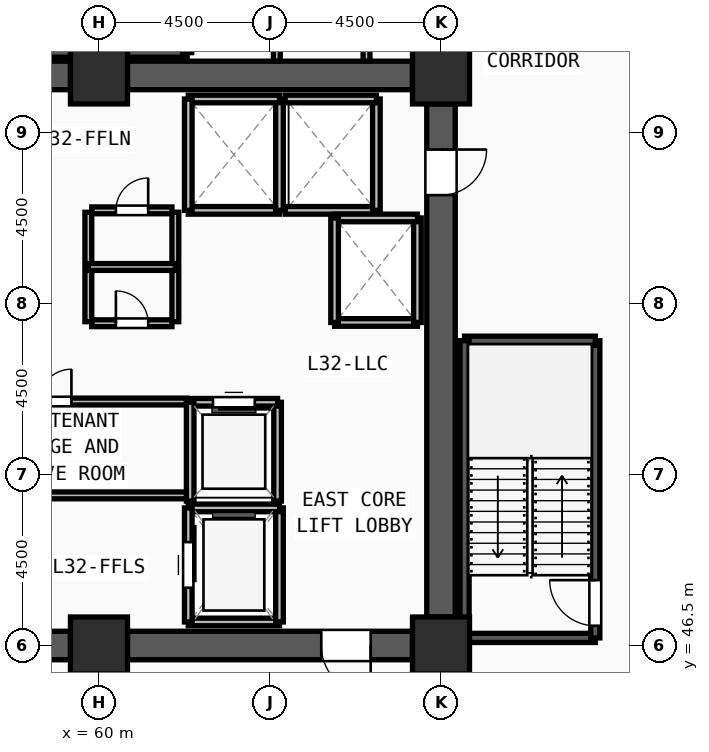
"""IFC4 building model, lengths in metres.
Left out: names, types, materials, properties, quantities, classifications, styles, units other than length and angle.
Written with IfcOpenShell. Run it as: python <this file> out.ifc"""

import sys

from ifc_helpers import new_model, si_unit, direction, frame, frame_2d, origin, origin_2d, place, context, subcontext, project, spatial, rectangle, extrude, source, transform, mapped, element, fill, save


model = new_model("IFC4")
c1 = context("Model", 3, precision=1e-05, world=origin(), true_north=direction((0.0, 1.0)))
c2 = subcontext(c1, "Body", "Model", "MODEL_VIEW")
j1 = project(units=[si_unit("LENGTHUNIT", "METRE"), si_unit("PLANEANGLEUNIT", "RADIAN")], contexts=[c1])
p1 = place(None, origin())
s1 = spatial("IfcSite", under=j1, at=p1, CompositionType="ELEMENT")
p2 = place(p1, origin())
s2 = spatial("IfcBuilding", under=s1, at=p2, CompositionType="ELEMENT")
p3 = place(p2, frame((0.0, 0.0, 124.5)))
s3 = spatial("IfcBuildingStorey", under=s2, at=p3, CompositionType="ELEMENT", Elevation=124.5)
m1 = source(origin(), c2, "Body", "SweptSolid", [
    extrude(rectangle(XDim=1.5, YDim=1.5, at=origin_2d()), origin(), (0.0, 0.0, 1.0), 3.75),
])
for number, where, z_axis, x_axis in (
    (1, (60.0, 46.5, 0.0), (0.0, 0.0, 1.0), (1.0, 0.0, 0.0)),
    (2, (69.0, 46.5, 0.0), (0.0, 0.0, 1.0), (1.0, 0.0, 0.0)),
    (3, (69.0, 61.5, 0.0), (0.0, 0.0, 1.0), (1.0, 0.0, 0.0)),
    (4, (60.0, 61.5, 0.0), (0.0, 0.0, 1.0), (1.0, 0.0, 0.0)),
):
    element("IfcColumn", number, at=place(p3, frame(where, z_axis=z_axis, x_axis=x_axis)), inside=s3, PredefinedType="COLUMN", context=c2, shape_type="MappedRepresentation", body=[
        mapped(m1, transform((0.0, 0.0, 0.0), x_axis=(1.0, 0.0, 0.0), y_axis=(0.0, 1.0, 0.0), z_axis=(0.0, 0.0, 1.0), scale=1.0)),
    ])
for number, where, z_axis, x_axis in (
    (5, (51.75, 61.5, 0.0), (0.0, 0.0, 1.0), (1.0, 0.0, 0.0)),
    (6, (60.75, 61.5, 0.0), (0.0, 0.0, 1.0), (1.0, 0.0, 0.0)),
):
    element("IfcWall", number, at=place(p3, frame(where, z_axis=z_axis, x_axis=x_axis)), inside=s3, PredefinedType="SHEAR", context=c2, shape_type="SweptSolid", body=[
        extrude(rectangle(XDim=7.5, YDim=0.75, at=frame_2d((3.75, 0.0))), origin(), (0.0, 0.0, 1.0), 3.57),
    ])
p4 = place(p3, frame((69.0, 60.75, 0.0), z_axis=(0.0, 0.0, 1.0), x_axis=(0.0, -1.0, 0.0)))
e7 = element("IfcWall", 7, at=p4, inside=s3, PredefinedType="SHEAR", context=c2, shape_type="SweptSolid", body=[
    extrude(rectangle(XDim=13.5, YDim=0.75, at=frame_2d((6.75, 0.0))), origin(), (0.0, 0.0, 1.0), 3.57),
])
m2 = source(origin(), c2, "Body", "SweptSolid", [
    extrude(rectangle(XDim=1.2, YDim=2.2, at=frame_2d((0.6, 1.1))), frame((0.0, 0.385, 0.0), z_axis=(0.0, -1.0, 0.0), x_axis=(1.0, 0.0, 0.0)), (0.0, 0.0, 1.0), 0.77),
])
p5 = place(p4, frame((1.2, 0.0, 0.0)))
e8 = element("IfcOpeningElement", 8, at=p5, cuts=e7, PredefinedType="OPENING", context=c2, shape_type="MappedRepresentation", body=[
    mapped(m2, transform((0.0, 0.0, 0.0), x_axis=(1.0, 0.0, 0.0), y_axis=(0.0, 1.0, 0.0), z_axis=(0.0, 0.0, 1.0), scale=1.0)),
])
p6 = place(p3, frame((68.25, 46.5, 0.0), z_axis=(0.0, 0.0, 1.0), x_axis=(-1.0, 0.0, 0.0)))
e9 = element("IfcWall", 9, at=p6, inside=s3, PredefinedType="SHEAR", context=c2, shape_type="SweptSolid", body=[
    extrude(rectangle(XDim=7.5, YDim=0.75, at=frame_2d((3.75, 0.0))), origin(), (0.0, 0.0, 1.0), 3.57),
])
m3 = source(origin(), c2, "Body", "SweptSolid", [
    extrude(rectangle(XDim=1.3, YDim=2.2, at=frame_2d((0.65, 1.1))), frame((0.0, 0.385, 0.0), z_axis=(0.0, -1.0, 0.0), x_axis=(1.0, 0.0, 0.0)), (0.0, 0.0, 1.0), 0.77),
])
p7 = place(p6, frame((1.1, 0.0, 0.0)))
e10 = element("IfcOpeningElement", 10, at=p7, cuts=e9, PredefinedType="OPENING", context=c2, shape_type="MappedRepresentation", body=[
    mapped(m3, transform((0.0, 0.0, 0.0), x_axis=(1.0, 0.0, 0.0), y_axis=(0.0, 1.0, 0.0), z_axis=(0.0, 0.0, 1.0), scale=1.0)),
])
p8 = place(p3, frame((59.25, 46.5, 0.0), z_axis=(0.0, 0.0, 1.0), x_axis=(-1.0, 0.0, 0.0)))
e11 = element("IfcWall", 11, at=p8, inside=s3, PredefinedType="SHEAR", context=c2, shape_type="SweptSolid", body=[
    extrude(rectangle(XDim=7.5, YDim=0.75, at=frame_2d((3.75, 0.0))), origin(), (0.0, 0.0, 1.0), 3.57),
])
p9 = place(p8, frame((5.1, 0.0, 0.0)))
e12 = element("IfcOpeningElement", 12, at=p9, cuts=e11, PredefinedType="OPENING", context=c2, shape_type="MappedRepresentation", body=[
    mapped(m3, transform((0.0, 0.0, 0.0), x_axis=(1.0, 0.0, 0.0), y_axis=(0.0, 1.0, 0.0), z_axis=(0.0, 0.0, 1.0), scale=1.0)),
])
m4 = source(origin(), c2, "Body", "SweptSolid", [
    extrude(rectangle(XDim=1.0, YDim=2.2, at=frame_2d((0.5, 1.1))), frame((0.0, 0.385, 0.0), z_axis=(0.0, -1.0, 0.0), x_axis=(1.0, 0.0, 0.0)), (0.0, 0.0, 1.0), 0.77),
])
p10 = place(p8, frame((0.6, 0.0, 0.0)))
e13 = element("IfcOpeningElement", 13, at=p10, cuts=e11, PredefinedType="OPENING", context=c2, shape_type="MappedRepresentation", body=[
    mapped(m4, transform((0.0, 0.0, 0.0), x_axis=(1.0, 0.0, 0.0), y_axis=(0.0, 1.0, 0.0), z_axis=(0.0, 0.0, 1.0), scale=1.0)),
])
p11 = place(p3, frame((69.62, 46.7, 0.0), z_axis=(0.0, 0.0, 1.0), x_axis=(1.0, 0.0, 0.0)))
e14 = element("IfcWall", 14, at=p11, inside=s3, PredefinedType="SOLIDWALL", context=c2, shape_type="SweptSolid", body=[
    extrude(rectangle(XDim=3.44, YDim=0.24, at=frame_2d((1.72, 0.0))), origin(), (0.0, 0.0, 1.0), 3.57),
])
p12 = place(p3, frame((73.06, 46.7, 0.0), z_axis=(0.0, 0.0, 1.0), x_axis=(0.0, 1.0, 0.0)))
e15 = element("IfcWall", 15, at=p12, inside=s3, PredefinedType="SOLIDWALL", context=c2, shape_type="SweptSolid", body=[
    extrude(rectangle(XDim=7.82, YDim=0.24, at=frame_2d((3.91, 0.0))), origin(), (0.0, 0.0, 1.0), 3.57),
])
m5 = source(origin(), c2, "Body", "SweptSolid", [
    extrude(rectangle(XDim=1.2, YDim=2.2, at=frame_2d((0.6, 1.1))), frame((0.0, 0.13, 0.0), z_axis=(0.0, -1.0, 0.0), x_axis=(1.0, 0.0, 0.0)), (0.0, 0.0, 1.0), 0.26),
])
p13 = place(p12, frame((0.32, 0.0, 0.0)))
e16 = element("IfcOpeningElement", 16, at=p13, cuts=e15, PredefinedType="OPENING", context=c2, shape_type="MappedRepresentation", body=[
    mapped(m5, transform((0.0, 0.0, 0.0), x_axis=(1.0, 0.0, 0.0), y_axis=(0.0, 1.0, 0.0), z_axis=(0.0, 0.0, 1.0), scale=1.0)),
])
p14 = place(p3, frame((73.06, 54.52, 0.0), z_axis=(0.0, 0.0, 1.0), x_axis=(-1.0, 0.0, 0.0)))
e17 = element("IfcWall", 17, at=p14, inside=s3, PredefinedType="SOLIDWALL", context=c2, shape_type="SweptSolid", body=[
    extrude(rectangle(XDim=3.44, YDim=0.24, at=frame_2d((1.72, 0.0))), origin(), (0.0, 0.0, 1.0), 3.57),
])
for number, where, z_axis, x_axis in (
    (18, (69.62, 54.52, 0.0), (0.0, 0.0, 1.0), (0.0, -1.0, 0.0)),
    (19, (54.5, 62.1, 0.0), (0.0, 0.0, 1.0), (1.0, 0.0, 0.0)),
):
    element("IfcWall", number, at=place(p3, frame(where, z_axis=z_axis, x_axis=x_axis)), inside=s3, PredefinedType="SOLIDWALL", context=c2, shape_type="SweptSolid", body=[
        extrude(rectangle(XDim=7.82, YDim=0.24, at=frame_2d((3.91, 0.0))), origin(), (0.0, 0.0, 1.0), 3.57),
    ])
p15 = place(p3, frame((62.32, 62.1, 0.0), z_axis=(0.0, 0.0, 1.0), x_axis=(0.0, 1.0, 0.0)))
e20 = element("IfcWall", 20, at=p15, inside=s3, PredefinedType="SOLIDWALL", context=c2, shape_type="SweptSolid", body=[
    extrude(rectangle(XDim=3.44, YDim=0.24, at=frame_2d((1.72, 0.0))), origin(), (0.0, 0.0, 1.0), 3.57),
])
p16 = place(p3, frame((62.35, 47.12, 0.0), z_axis=(0.0, 0.0, 1.0), x_axis=(1.0, 0.0, 0.0)))
e21 = element("IfcWall", 21, at=p16, inside=s3, PredefinedType="SOLIDWALL", context=c2, shape_type="SweptSolid", body=[
    extrude(rectangle(XDim=2.4, YDim=0.2, at=frame_2d((1.2, 0.0))), origin(), (0.0, 0.0, 1.0), 3.57),
])
p17 = place(p3, frame((64.75, 47.12, 0.0), z_axis=(0.0, 0.0, 1.0), x_axis=(0.0, 1.0, 0.0)))
e22 = element("IfcWall", 22, at=p17, inside=s3, PredefinedType="SOLIDWALL", context=c2, shape_type="SweptSolid", body=[
    extrude(rectangle(XDim=3.0, YDim=0.2, at=frame_2d((1.5, 0.0))), origin(), (0.0, 0.0, 1.0), 3.57),
])
p18 = place(p3, frame((64.75, 50.12, 0.0), z_axis=(0.0, 0.0, 1.0), x_axis=(-1.0, 0.0, 0.0)))
e23 = element("IfcWall", 23, at=p18, inside=s3, PredefinedType="SOLIDWALL", context=c2, shape_type="SweptSolid", body=[
    extrude(rectangle(XDim=2.4, YDim=0.2, at=frame_2d((1.2, 0.0))), origin(), (0.0, 0.0, 1.0), 3.57),
])
p19 = place(p3, frame((62.35, 50.12, 0.0), z_axis=(0.0, 0.0, 1.0), x_axis=(0.0, -1.0, 0.0)))
e24 = element("IfcWall", 24, at=p19, inside=s3, PredefinedType="SOLIDWALL", context=c2, shape_type="SweptSolid", body=[
    extrude(rectangle(XDim=3.0, YDim=0.2, at=frame_2d((1.5, 0.0))), origin(), (0.0, 0.0, 1.0), 3.57),
])
m6 = source(origin(), c2, "Body", "SweptSolid", [
    extrude(rectangle(XDim=1.2, YDim=2.3, at=frame_2d((0.6, 1.15))), frame((0.0, 0.11, 0.0), z_axis=(0.0, -1.0, 0.0), x_axis=(1.0, 0.0, 0.0)), (0.0, 0.0, 1.0), 0.22),
])
p20 = place(p19, frame((0.9, 0.0, 0.0)))
e25 = element("IfcOpeningElement", 25, at=p20, cuts=e24, PredefinedType="OPENING", context=c2, shape_type="MappedRepresentation", body=[
    mapped(m6, transform((0.0, 0.0, 0.0), x_axis=(1.0, 0.0, 0.0), y_axis=(0.0, 1.0, 0.0), z_axis=(0.0, 0.0, 1.0), scale=1.0)),
])
p21 = place(p3, frame((62.35, 57.95, 0.0), z_axis=(0.0, 0.0, 1.0), x_axis=(1.0, 0.0, 0.0)))
e26 = element("IfcWall", 26, at=p21, inside=s3, PredefinedType="SOLIDWALL", context=c2, shape_type="SweptSolid", body=[
    extrude(rectangle(XDim=2.4, YDim=0.2, at=frame_2d((1.2, 0.0))), origin(), (0.0, 0.0, 1.0), 3.57),
])
p22 = place(p3, frame((64.75, 57.95, 0.0), z_axis=(0.0, 0.0, 1.0), x_axis=(0.0, 1.0, 0.0)))
e27 = element("IfcWall", 27, at=p22, inside=s3, PredefinedType="SOLIDWALL", context=c2, shape_type="SweptSolid", body=[
    extrude(rectangle(XDim=2.93, YDim=0.2, at=frame_2d((1.465, 0.0))), origin(), (0.0, 0.0, 1.0), 3.57),
])
p23 = place(p3, frame((64.75, 60.88, 0.0), z_axis=(0.0, 0.0, 1.0), x_axis=(-1.0, 0.0, 0.0)))
e28 = element("IfcWall", 28, at=p23, inside=s3, PredefinedType="SOLIDWALL", context=c2, shape_type="SweptSolid", body=[
    extrude(rectangle(XDim=2.4, YDim=0.2, at=frame_2d((1.2, 0.0))), origin(), (0.0, 0.0, 1.0), 3.57),
])
p24 = place(p3, frame((62.35, 60.88, 0.0), z_axis=(0.0, 0.0, 1.0), x_axis=(0.0, -1.0, 0.0)))
e29 = element("IfcWall", 29, at=p24, inside=s3, PredefinedType="SOLIDWALL", context=c2, shape_type="SweptSolid", body=[
    extrude(rectangle(XDim=2.93, YDim=0.2, at=frame_2d((1.465, 0.0))), origin(), (0.0, 0.0, 1.0), 3.57),
])
p25 = place(p3, frame((64.9, 57.95, 0.0), z_axis=(0.0, 0.0, 1.0), x_axis=(1.0, 0.0, 0.0)))
e30 = element("IfcWall", 30, at=p25, inside=s3, PredefinedType="SOLIDWALL", context=c2, shape_type="SweptSolid", body=[
    extrude(rectangle(XDim=2.4, YDim=0.2, at=frame_2d((1.2, 0.0))), origin(), (0.0, 0.0, 1.0), 3.57),
])
p26 = place(p3, frame((67.3, 57.95, 0.0), z_axis=(0.0, 0.0, 1.0), x_axis=(0.0, 1.0, 0.0)))
e31 = element("IfcWall", 31, at=p26, inside=s3, PredefinedType="SOLIDWALL", context=c2, shape_type="SweptSolid", body=[
    extrude(rectangle(XDim=2.93, YDim=0.2, at=frame_2d((1.465, 0.0))), origin(), (0.0, 0.0, 1.0), 3.57),
])
p27 = place(p3, frame((67.3, 60.88, 0.0), z_axis=(0.0, 0.0, 1.0), x_axis=(-1.0, 0.0, 0.0)))
e32 = element("IfcWall", 32, at=p27, inside=s3, PredefinedType="SOLIDWALL", context=c2, shape_type="SweptSolid", body=[
    extrude(rectangle(XDim=2.4, YDim=0.2, at=frame_2d((1.2, 0.0))), origin(), (0.0, 0.0, 1.0), 3.57),
])
p28 = place(p3, frame((66.2, 55.0, 0.0), z_axis=(0.0, 0.0, 1.0), x_axis=(1.0, 0.0, 0.0)))
e33 = element("IfcWall", 33, at=p28, inside=s3, PredefinedType="SOLIDWALL", context=c2, shape_type="SweptSolid", body=[
    extrude(rectangle(XDim=2.18, YDim=0.2, at=frame_2d((1.09, 0.0))), origin(), (0.0, 0.0, 1.0), 3.57),
])
p29 = place(p3, frame((68.38, 55.0, 0.0), z_axis=(0.0, 0.0, 1.0), x_axis=(0.0, 1.0, 0.0)))
e34 = element("IfcWall", 34, at=p29, inside=s3, PredefinedType="SOLIDWALL", context=c2, shape_type="SweptSolid", body=[
    extrude(rectangle(XDim=2.75, YDim=0.2, at=frame_2d((1.375, 0.0))), origin(), (0.0, 0.0, 1.0), 3.57),
])
p30 = place(p3, frame((68.38, 57.75, 0.0), z_axis=(0.0, 0.0, 1.0), x_axis=(-1.0, 0.0, 0.0)))
e35 = element("IfcWall", 35, at=p30, inside=s3, PredefinedType="SOLIDWALL", context=c2, shape_type="SweptSolid", body=[
    extrude(rectangle(XDim=2.18, YDim=0.2, at=frame_2d((1.09, 0.0))), origin(), (0.0, 0.0, 1.0), 3.57),
])
p31 = place(p3, frame((66.2, 57.75, 0.0), z_axis=(0.0, 0.0, 1.0), x_axis=(0.0, -1.0, 0.0)))
e36 = element("IfcWall", 36, at=p31, inside=s3, PredefinedType="SOLIDWALL", context=c2, shape_type="SweptSolid", body=[
    extrude(rectangle(XDim=2.75, YDim=0.2, at=frame_2d((1.375, 0.0))), origin(), (0.0, 0.0, 1.0), 3.57),
])
p32 = place(p3, frame((64.7, 50.3, 0.0), z_axis=(0.0, 0.0, 1.0), x_axis=(0.0, 1.0, 0.0)))
e37 = element("IfcWall", 37, at=p32, inside=s3, PredefinedType="SOLIDWALL", context=c2, shape_type="SweptSolid", body=[
    extrude(rectangle(XDim=2.6, YDim=0.2, at=frame_2d((1.3, 0.0))), origin(), (0.0, 0.0, 1.0), 3.57),
])
p33 = place(p3, frame((64.7, 52.9, 0.0), z_axis=(0.0, 0.0, 1.0), x_axis=(-1.0, 0.0, 0.0)))
e38 = element("IfcWall", 38, at=p33, inside=s3, PredefinedType="SOLIDWALL", context=c2, shape_type="SweptSolid", body=[
    extrude(rectangle(XDim=2.3, YDim=0.2, at=frame_2d((1.15, 0.0))), origin(), (0.0, 0.0, 1.0), 3.57),
])
m7 = source(origin(), c2, "Body", "SweptSolid", [
    extrude(rectangle(XDim=1.1, YDim=2.2, at=frame_2d((0.55, 1.1))), frame((0.0, 0.11, 0.0), z_axis=(0.0, -1.0, 0.0), x_axis=(1.0, 0.0, 0.0)), (0.0, 0.0, 1.0), 0.22),
])
p34 = place(p33, frame((0.6, 0.0, 0.0)))
e39 = element("IfcOpeningElement", 39, at=p34, cuts=e38, PredefinedType="OPENING", context=c2, shape_type="MappedRepresentation", body=[
    mapped(m7, transform((0.0, 0.0, 0.0), x_axis=(1.0, 0.0, 0.0), y_axis=(0.0, 1.0, 0.0), z_axis=(0.0, 0.0, 1.0), scale=1.0)),
])
p35 = place(p3, frame((62.4, 52.9, 0.0), z_axis=(0.0, 0.0, 1.0), x_axis=(0.0, -1.0, 0.0)))
e40 = element("IfcWall", 40, at=p35, inside=s3, PredefinedType="SOLIDWALL", context=c2, shape_type="SweptSolid", body=[
    extrude(rectangle(XDim=2.6, YDim=0.2, at=frame_2d((1.3, 0.0))), origin(), (0.0, 0.0, 1.0), 3.57),
])
p36 = place(p3, frame((55.37, 52.92, 0.0), z_axis=(0.0, 0.0, 1.0), x_axis=(1.0, 0.0, 0.0)))
e41 = element("IfcWall", 41, at=p36, inside=s3, PredefinedType="PARTITIONING", context=c2, shape_type="SweptSolid", body=[
    extrude(rectangle(XDim=6.93, YDim=0.18, at=frame_2d((3.465, 0.0))), origin(), (0.0, 0.0, 1.0), 3.57),
])
m8 = source(origin(), c2, "Body", "SweptSolid", [
    extrude(rectangle(XDim=0.85, YDim=2.1, at=frame_2d((0.425, 1.05))), frame((0.0, 0.1, 0.0), z_axis=(0.0, -1.0, 0.0), x_axis=(1.0, 0.0, 0.0)), (0.0, 0.0, 1.0), 0.2),
])
p37 = place(p36, frame((3.055, 0.0, 0.0)))
e42 = element("IfcOpeningElement", 42, at=p37, cuts=e41, PredefinedType="OPENING", context=c2, shape_type="MappedRepresentation", body=[
    mapped(m8, transform((0.0, 0.0, 0.0), x_axis=(1.0, 0.0, 0.0), y_axis=(0.0, 1.0, 0.0), z_axis=(0.0, 0.0, 1.0), scale=1.0)),
])
p38 = place(p3, frame((59.81, 54.98, 0.0), z_axis=(0.0, 0.0, 1.0), x_axis=(1.0, 0.0, 0.0)))
e43 = element("IfcWall", 43, at=p38, inside=s3, PredefinedType="PARTITIONING", context=c2, shape_type="SweptSolid", body=[
    extrude(rectangle(XDim=2.11, YDim=0.18, at=frame_2d((1.055, 0.0))), origin(), (0.0, 0.0, 1.0), 3.57),
])
p39 = place(p38, frame((0.635, 0.0, 0.0)))
e44 = element("IfcOpeningElement", 44, at=p39, cuts=e43, PredefinedType="OPENING", context=c2, shape_type="MappedRepresentation", body=[
    mapped(m8, transform((0.0, 0.0, 0.0), x_axis=(1.0, 0.0, 0.0), y_axis=(0.0, 1.0, 0.0), z_axis=(0.0, 0.0, 1.0), scale=1.0)),
])
p40 = place(p3, frame((59.81, 57.95, 0.0), z_axis=(0.0, 0.0, 1.0), x_axis=(1.0, 0.0, 0.0)))
e45 = element("IfcWall", 45, at=p40, inside=s3, PredefinedType="PARTITIONING", context=c2, shape_type="SweptSolid", body=[
    extrude(rectangle(XDim=2.11, YDim=0.18, at=frame_2d((1.055, 0.0))), origin(), (0.0, 0.0, 1.0), 3.57),
])
p41 = place(p40, frame((0.635, 0.0, 0.0)))
e46 = element("IfcOpeningElement", 46, at=p41, cuts=e45, PredefinedType="OPENING", context=c2, shape_type="MappedRepresentation", body=[
    mapped(m8, transform((0.0, 0.0, 0.0), x_axis=(1.0, 0.0, 0.0), y_axis=(0.0, 1.0, 0.0), z_axis=(0.0, 0.0, 1.0), scale=1.0)),
])
for number, where, z_axis, x_axis in (
    (47, (59.72, 55.02, 0.0), (0.0, 0.0, 1.0), (0.0, 1.0, 0.0)),
    (48, (62.01, 55.02, 0.0), (0.0, 0.0, 1.0), (0.0, 1.0, 0.0)),
):
    element("IfcWall", number, at=place(p3, frame(where, z_axis=z_axis, x_axis=x_axis)), inside=s3, PredefinedType="PARTITIONING", context=c2, shape_type="SweptSolid", body=[
        extrude(rectangle(XDim=2.88, YDim=0.18, at=frame_2d((1.44, 0.0))), origin(), (0.0, 0.0, 1.0), 3.57),
    ])
p42 = place(p3, frame((59.72, 56.46, 0.0), z_axis=(0.0, 0.0, 1.0), x_axis=(1.0, 0.0, 0.0)))
e49 = element("IfcWall", 49, at=p42, inside=s3, PredefinedType="PARTITIONING", context=c2, shape_type="SweptSolid", body=[
    extrude(rectangle(XDim=2.29, YDim=0.18, at=frame_2d((1.145, 0.0))), origin(), (0.0, 0.0, 1.0), 3.57),
])
for number, where, z_axis, x_axis in (
    (50, (64.68, 61.875, 0.0), (0.0, 0.0, 1.0), (0.0, 1.0, 0.0)),
    (51, (67.04, 61.875, 0.0), (0.0, 0.0, 1.0), (0.0, 1.0, 0.0)),
):
    element("IfcWall", number, at=place(p3, frame(where, z_axis=z_axis, x_axis=x_axis)), inside=s3, PredefinedType="PARTITIONING", context=c2, shape_type="SweptSolid", body=[
        extrude(rectangle(XDim=3.705, YDim=0.18, at=frame_2d((1.853, 0.0))), origin(), (0.0, 0.0, 1.0), 3.57),
    ])
p43 = place(p3, frame((69.46, 61.95, 0.0), z_axis=(0.0, 0.0, 1.0), x_axis=(0.0, 1.0, 0.0)))
e52 = element("IfcWall", 52, at=p43, inside=s3, PredefinedType="PARTITIONING", context=c2, shape_type="SweptSolid", body=[
    extrude(rectangle(XDim=3.63, YDim=0.18, at=frame_2d((1.815, 0.0))), origin(), (0.0, 0.0, 1.0), 3.57),
])
p44 = place(p3, frame((55.37, 50.45, 0.0), z_axis=(0.0, 0.0, 1.0), x_axis=(1.0, 0.0, 0.0)))
e53 = element("IfcWall", 53, at=p44, inside=s3, PredefinedType="PARTITIONING", context=c2, shape_type="SweptSolid", body=[
    extrude(rectangle(XDim=6.93, YDim=0.18, at=frame_2d((3.465, 0.0))), origin(), (0.0, 0.0, 1.0), 3.57),
])
m9 = source(origin(), c2, "Body", "SweptSolid", [
    extrude(rectangle(XDim=1.3, YDim=2.2, at=frame_2d((0.65, 1.1))), frame((0.0, 0.025, 0.0), z_axis=(0.0, -1.0, 0.0), x_axis=(1.0, 0.0, 0.0)), (0.0, 0.0, 1.0), 0.05),
])
p45 = place(p7, origin())
e54 = element("IfcDoor", 54, at=p45, inside=s3, OperationType="SINGLE_SWING_LEFT", PredefinedType="DOOR", context=c2, shape_type="MappedRepresentation", body=[
    mapped(m9, transform((0.0, 0.0, 0.0), x_axis=(1.0, 0.0, 0.0), y_axis=(0.0, 1.0, 0.0), z_axis=(0.0, 0.0, 1.0), scale=1.0)),
])
fill(e10, e54)
m10 = source(origin(), c2, "Body", "SweptSolid", [
    extrude(rectangle(XDim=1.2, YDim=2.2, at=frame_2d((0.6, 1.1))), frame((0.0, 0.025, 0.0), z_axis=(0.0, -1.0, 0.0), x_axis=(1.0, 0.0, 0.0)), (0.0, 0.0, 1.0), 0.05),
])
p46 = place(p5, origin())
e55 = element("IfcDoor", 55, at=p46, inside=s3, OperationType="SINGLE_SWING_LEFT", PredefinedType="DOOR", context=c2, shape_type="MappedRepresentation", body=[
    mapped(m10, transform((0.0, 0.0, 0.0), x_axis=(1.0, 0.0, 0.0), y_axis=(0.0, 1.0, 0.0), z_axis=(0.0, 0.0, 1.0), scale=1.0)),
])
fill(e8, e55)
p47 = place(p13, origin())
e56 = element("IfcDoor", 56, at=p47, inside=s3, OperationType="SINGLE_SWING_RIGHT", PredefinedType="DOOR", context=c2, shape_type="MappedRepresentation", body=[
    mapped(m10, transform((0.0, 0.0, 0.0), x_axis=(1.0, 0.0, 0.0), y_axis=(0.0, 1.0, 0.0), z_axis=(0.0, 0.0, 1.0), scale=1.0)),
])
fill(e16, e56)
m11 = source(origin(), c2, "Body", "SweptSolid", [
    extrude(rectangle(XDim=1.2, YDim=2.3, at=frame_2d((0.6, 1.15))), frame((0.0, 0.025, 0.0), z_axis=(0.0, -1.0, 0.0), x_axis=(1.0, 0.0, 0.0)), (0.0, 0.0, 1.0), 0.05),
])
p48 = place(p20, origin())
e57 = element("IfcDoor", 57, at=p48, inside=s3, OperationType="SLIDING_TO_LEFT", PredefinedType="DOOR", context=c2, shape_type="MappedRepresentation", body=[
    mapped(m11, transform((0.0, 0.0, 0.0), x_axis=(1.0, 0.0, 0.0), y_axis=(0.0, 1.0, 0.0), z_axis=(0.0, 0.0, 1.0), scale=1.0)),
])
fill(e25, e57)
m12 = source(origin(), c2, "Body", "SweptSolid", [
    extrude(rectangle(XDim=1.1, YDim=2.2, at=frame_2d((0.55, 1.1))), frame((0.0, 0.025, 0.0), z_axis=(0.0, -1.0, 0.0), x_axis=(1.0, 0.0, 0.0)), (0.0, 0.0, 1.0), 0.05),
])
p49 = place(p34, origin())
e58 = element("IfcDoor", 58, at=p49, inside=s3, OperationType="SLIDING_TO_LEFT", PredefinedType="DOOR", context=c2, shape_type="MappedRepresentation", body=[
    mapped(m12, transform((0.0, 0.0, 0.0), x_axis=(1.0, 0.0, 0.0), y_axis=(0.0, 1.0, 0.0), z_axis=(0.0, 0.0, 1.0), scale=1.0)),
])
fill(e39, e58)
m13 = source(origin(), c2, "Body", "SweptSolid", [
    extrude(rectangle(XDim=0.85, YDim=2.1, at=frame_2d((0.425, 1.05))), frame((0.0, 0.025, 0.0), z_axis=(0.0, -1.0, 0.0), x_axis=(1.0, 0.0, 0.0)), (0.0, 0.0, 1.0), 0.05),
])
p50 = place(p37, origin())
e59 = element("IfcDoor", 59, at=p50, inside=s3, OperationType="SINGLE_SWING_RIGHT", PredefinedType="DOOR", context=c2, shape_type="MappedRepresentation", body=[
    mapped(m13, transform((0.0, 0.0, 0.0), x_axis=(1.0, 0.0, 0.0), y_axis=(0.0, 1.0, 0.0), z_axis=(0.0, 0.0, 1.0), scale=1.0)),
])
fill(e42, e59)
p51 = place(p39, origin())
e60 = element("IfcDoor", 60, at=p51, inside=s3, OperationType="SINGLE_SWING_LEFT", PredefinedType="DOOR", context=c2, shape_type="MappedRepresentation", body=[
    mapped(m13, transform((0.0, 0.0, 0.0), x_axis=(1.0, 0.0, 0.0), y_axis=(0.0, 1.0, 0.0), z_axis=(0.0, 0.0, 1.0), scale=1.0)),
])
fill(e44, e60)
p52 = place(p41, origin())
e61 = element("IfcDoor", 61, at=p52, inside=s3, OperationType="SINGLE_SWING_RIGHT", PredefinedType="DOOR", context=c2, shape_type="MappedRepresentation", body=[
    mapped(m13, transform((0.0, 0.0, 0.0), x_axis=(1.0, 0.0, 0.0), y_axis=(0.0, 1.0, 0.0), z_axis=(0.0, 0.0, 1.0), scale=1.0)),
])
fill(e46, e61)
save(model, sys.argv[1])
